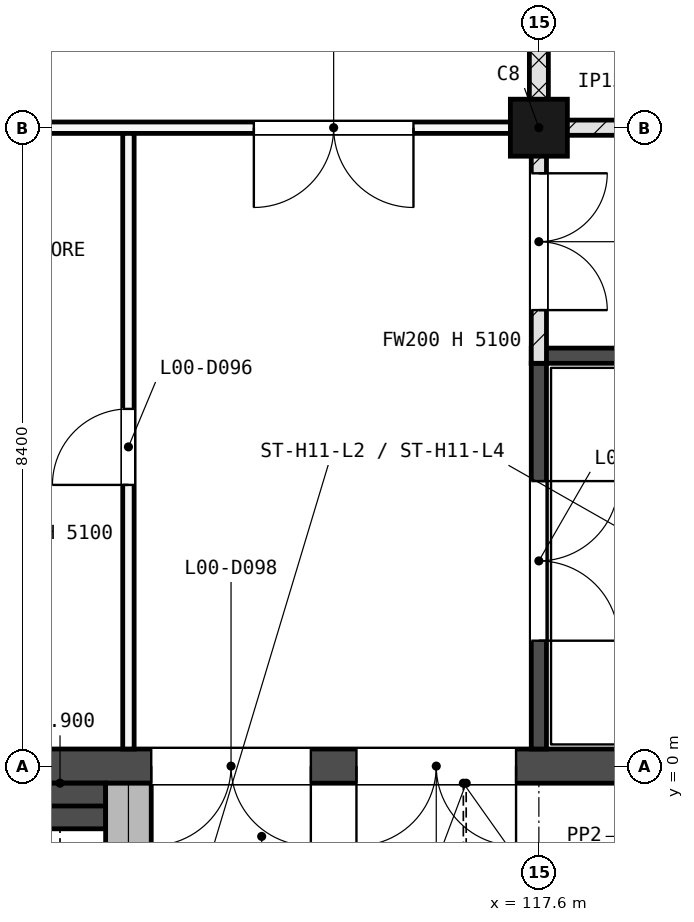
"""IFC4 building model, lengths in metres.
Left out: names, types, materials, properties, quantities, classifications, styles, units other than length and angle.
Written with IfcOpenShell. Run it as: python <this file> out.ifc"""

import sys

from ifc_helpers import new_model, si_unit, direction, frame, frame_2d, origin, origin_2d, place, context, subcontext, project, spatial, rectangle, extrude, element, fill, save


model = new_model("IFC4")
c1 = context("Model", 3, precision=1e-05, world=origin(), true_north=direction((0.0, 1.0)))
c2 = subcontext(c1, "Body", "Model", "MODEL_VIEW")
j1 = project(units=[si_unit("LENGTHUNIT", "METRE"), si_unit("PLANEANGLEUNIT", "RADIAN")], contexts=[c1])
p1 = place(None, origin())
s1 = spatial("IfcSite", under=j1, at=p1, CompositionType="ELEMENT")
p2 = place(p1, origin())
s2 = spatial("IfcBuilding", under=s1, at=p2, CompositionType="ELEMENT")
p3 = place(p2, origin())
s3 = spatial("IfcBuildingStorey", under=s2, at=p3, CompositionType="ELEMENT", Elevation=0.0)
p4 = place(p3, frame((117.6, 8.4, -0.3), z_axis=(0.0, 0.0, 1.0), x_axis=(1.0, 0.0, 0.0)))
e1 = element("IfcColumn", 1, at=p4, inside=s3, PredefinedType="COLUMN", context=c2, shape_type="SweptSolid", body=[
    extrude(rectangle(XDim=0.75, YDim=0.75, at=origin_2d()), origin(), (0.0, 0.0, 1.0), 5.4),
])
p5 = place(p3, frame((0.0, 0.0, -0.3), z_axis=(0.0, 0.0, 1.0), x_axis=(1.0, 0.0, 0.0)))
e2 = element("IfcWall", 2, at=p5, inside=s3, PredefinedType="SOLIDWALL", context=c2, shape_type="SweptSolid", body=[
    extrude(rectangle(XDim=168.0, YDim=0.45, at=frame_2d((84.0, 0.0))), origin(), (0.0, 0.0, 1.0), 5.4),
])
p6 = place(p5, frame((34.8, 0.0, 2.7)))
e3 = element("IfcOpeningElement", 3, at=p6, cuts=e2, PredefinedType="OPENING", context=c2, shape_type="SweptSolid", body=[
    extrude(rectangle(XDim=1.8, YDim=1.2, at=frame_2d((0.9, 0.6))), frame((0.0, 0.235, 0.0), z_axis=(0.0, -1.0, 0.0), x_axis=(1.0, 0.0, 0.0)), (0.0, 0.0, 1.0), 0.47),
])
p7 = place(p5, frame((69.075, 0.0, 1.5)))
e4 = element("IfcOpeningElement", 4, at=p7, cuts=e2, PredefinedType="OPENING", context=c2, shape_type="SweptSolid", body=[
    extrude(rectangle(XDim=0.45, YDim=2.4, at=frame_2d((0.225, 1.2))), frame((0.0, 0.235, 0.0), z_axis=(0.0, -1.0, 0.0), x_axis=(1.0, 0.0, 0.0)), (0.0, 0.0, 1.0), 0.47),
])
p8 = place(p5, frame((73.275, 0.0, 1.5)))
e5 = element("IfcOpeningElement", 5, at=p8, cuts=e2, PredefinedType="OPENING", context=c2, shape_type="SweptSolid", body=[
    extrude(rectangle(XDim=0.45, YDim=2.4, at=frame_2d((0.225, 1.2))), frame((0.0, 0.235, 0.0), z_axis=(0.0, -1.0, 0.0), x_axis=(1.0, 0.0, 0.0)), (0.0, 0.0, 1.0), 0.47),
])
p9 = place(p5, frame((135.0, 0.0, 2.7)))
e6 = element("IfcOpeningElement", 6, at=p9, cuts=e2, PredefinedType="OPENING", context=c2, shape_type="SweptSolid", body=[
    extrude(rectangle(XDim=1.8, YDim=1.2, at=frame_2d((0.9, 0.6))), frame((0.0, 0.235, 0.0), z_axis=(0.0, -1.0, 0.0), x_axis=(1.0, 0.0, 0.0)), (0.0, 0.0, 1.0), 0.47),
])
p10 = place(p5, frame((144.0, 0.0, 2.7)))
e7 = element("IfcOpeningElement", 7, at=p10, cuts=e2, PredefinedType="OPENING", context=c2, shape_type="SweptSolid", body=[
    extrude(rectangle(XDim=1.8, YDim=1.2, at=frame_2d((0.9, 0.6))), frame((0.0, 0.235, 0.0), z_axis=(0.0, -1.0, 0.0), x_axis=(1.0, 0.0, 0.0)), (0.0, 0.0, 1.0), 0.47),
])
p11 = place(p5, frame((114.6, 0.0, 0.3), z_axis=(0.0, 0.0, 1.0), x_axis=(-1.0, 0.0, 0.0)))
e8 = element("IfcOpeningElement", 8, at=p11, cuts=e2, PredefinedType="OPENING", context=c2, shape_type="SweptSolid", body=[
    extrude(rectangle(XDim=2.1, YDim=2.2, at=frame_2d((1.05, 1.1))), frame((0.0, 0.235, 0.0), z_axis=(0.0, -1.0, 0.0), x_axis=(1.0, 0.0, 0.0)), (0.0, 0.0, 1.0), 0.47),
])
p12 = place(p5, frame((117.3, 0.0, 0.3), z_axis=(0.0, 0.0, 1.0), x_axis=(-1.0, 0.0, 0.0)))
e9 = element("IfcOpeningElement", 9, at=p12, cuts=e2, PredefinedType="OPENING", context=c2, shape_type="SweptSolid", body=[
    extrude(rectangle(XDim=2.1, YDim=2.2, at=frame_2d((1.05, 1.1))), frame((0.0, 0.235, 0.0), z_axis=(0.0, -1.0, 0.0), x_axis=(1.0, 0.0, 0.0)), (0.0, 0.0, 1.0), 0.47),
])
p13 = place(p5, frame((106.05, 0.0, 0.3), z_axis=(0.0, 0.0, 1.0), x_axis=(-1.0, 0.0, 0.0)))
e10 = element("IfcOpeningElement", 10, at=p13, cuts=e2, PredefinedType="OPENING", context=c2, shape_type="SweptSolid", body=[
    extrude(rectangle(XDim=2.1, YDim=2.2, at=frame_2d((1.05, 1.1))), frame((0.0, 0.235, 0.0), z_axis=(0.0, -1.0, 0.0), x_axis=(1.0, 0.0, 0.0)), (0.0, 0.0, 1.0), 0.47),
])
p14 = place(p5, frame((57.25, 0.0, 0.3), z_axis=(0.0, 0.0, 1.0), x_axis=(-1.0, 0.0, 0.0)))
e11 = element("IfcOpeningElement", 11, at=p14, cuts=e2, PredefinedType="OPENING", context=c2, shape_type="SweptSolid", body=[
    extrude(rectangle(XDim=2.1, YDim=2.2, at=frame_2d((1.05, 1.1))), frame((0.0, 0.235, 0.0), z_axis=(0.0, -1.0, 0.0), x_axis=(1.0, 0.0, 0.0)), (0.0, 0.0, 1.0), 0.47),
])
p15 = place(p5, frame((120.75, 0.0, 0.3), z_axis=(0.0, 0.0, 1.0), x_axis=(-1.0, 0.0, 0.0)))
e12 = element("IfcOpeningElement", 12, at=p15, cuts=e2, PredefinedType="OPENING", context=c2, shape_type="SweptSolid", body=[
    extrude(rectangle(XDim=2.1, YDim=2.2, at=frame_2d((1.05, 1.1))), frame((0.0, 0.235, 0.0), z_axis=(0.0, -1.0, 0.0), x_axis=(1.0, 0.0, 0.0)), (0.0, 0.0, 1.0), 0.47),
])
p16 = place(p5, frame((124.95, 0.0, 0.3), z_axis=(0.0, 0.0, 1.0), x_axis=(-1.0, 0.0, 0.0)))
e13 = element("IfcOpeningElement", 13, at=p16, cuts=e2, PredefinedType="OPENING", context=c2, shape_type="SweptSolid", body=[
    extrude(rectangle(XDim=2.1, YDim=2.2, at=frame_2d((1.05, 1.1))), frame((0.0, 0.235, 0.0), z_axis=(0.0, -1.0, 0.0), x_axis=(1.0, 0.0, 0.0)), (0.0, 0.0, 1.0), 0.47),
])
p17 = place(p5, frame((19.45, 0.0, 0.3), z_axis=(0.0, 0.0, 1.0), x_axis=(-1.0, 0.0, 0.0)))
e14 = element("IfcOpeningElement", 14, at=p17, cuts=e2, PredefinedType="OPENING", context=c2, shape_type="SweptSolid", body=[
    extrude(rectangle(XDim=2.1, YDim=2.2, at=frame_2d((1.05, 1.1))), frame((0.0, 0.235, 0.0), z_axis=(0.0, -1.0, 0.0), x_axis=(1.0, 0.0, 0.0)), (0.0, 0.0, 1.0), 0.47),
])
p18 = place(p5, frame((162.25, 0.0, 0.3), z_axis=(0.0, 0.0, 1.0), x_axis=(-1.0, 0.0, 0.0)))
e15 = element("IfcOpeningElement", 15, at=p18, cuts=e2, PredefinedType="OPENING", context=c2, shape_type="SweptSolid", body=[
    extrude(rectangle(XDim=2.1, YDim=2.2, at=frame_2d((1.05, 1.1))), frame((0.0, 0.235, 0.0), z_axis=(0.0, -1.0, 0.0), x_axis=(1.0, 0.0, 0.0)), (0.0, 0.0, 1.0), 0.47),
])
p19 = place(p5, frame((4.8, 0.0, 0.3), z_axis=(0.0, 0.0, 1.0), x_axis=(-1.0, 0.0, 0.0)))
e16 = element("IfcOpeningElement", 16, at=p19, cuts=e2, PredefinedType="OPENING", context=c2, shape_type="SweptSolid", body=[
    extrude(rectangle(XDim=1.2, YDim=2.2, at=frame_2d((0.6, 1.1))), frame((0.0, 0.235, 0.0), z_axis=(0.0, -1.0, 0.0), x_axis=(1.0, 0.0, 0.0)), (0.0, 0.0, 1.0), 0.47),
])
p20 = place(p5, frame((64.8, 0.0, 0.3), z_axis=(0.0, 0.0, 1.0), x_axis=(-1.0, 0.0, 0.0)))
e17 = element("IfcOpeningElement", 17, at=p20, cuts=e2, PredefinedType="OPENING", context=c2, shape_type="SweptSolid", body=[
    extrude(rectangle(XDim=1.2, YDim=2.2, at=frame_2d((0.6, 1.1))), frame((0.0, 0.235, 0.0), z_axis=(0.0, -1.0, 0.0), x_axis=(1.0, 0.0, 0.0)), (0.0, 0.0, 1.0), 0.47),
])
p21 = place(p5, frame((81.0, 0.0, 0.3), z_axis=(0.0, 0.0, 1.0), x_axis=(-1.0, 0.0, 0.0)))
e18 = element("IfcOpeningElement", 18, at=p21, cuts=e2, PredefinedType="OPENING", context=c2, shape_type="SweptSolid", body=[
    extrude(rectangle(XDim=2.4, YDim=2.4, at=frame_2d((1.2, 1.2))), frame((0.0, 0.235, 0.0), z_axis=(0.0, -1.0, 0.0), x_axis=(1.0, 0.0, 0.0)), (0.0, 0.0, 1.0), 0.47),
])
p22 = place(p5, frame((97.8, 0.0, 0.3), z_axis=(0.0, 0.0, 1.0), x_axis=(-1.0, 0.0, 0.0)))
e19 = element("IfcOpeningElement", 19, at=p22, cuts=e2, PredefinedType="OPENING", context=c2, shape_type="SweptSolid", body=[
    extrude(rectangle(XDim=2.4, YDim=2.4, at=frame_2d((1.2, 1.2))), frame((0.0, 0.235, 0.0), z_axis=(0.0, -1.0, 0.0), x_axis=(1.0, 0.0, 0.0)), (0.0, 0.0, 1.0), 0.47),
])
p23 = place(p5, frame((139.8, 0.0, 0.3), z_axis=(0.0, 0.0, 1.0), x_axis=(-1.0, 0.0, 0.0)))
e20 = element("IfcOpeningElement", 20, at=p23, cuts=e2, PredefinedType="OPENING", context=c2, shape_type="SweptSolid", body=[
    extrude(rectangle(XDim=2.4, YDim=2.1, at=frame_2d((1.2, 1.05))), frame((0.0, 0.235, 0.0), z_axis=(0.0, -1.0, 0.0), x_axis=(1.0, 0.0, 0.0)), (0.0, 0.0, 1.0), 0.47),
])
p24 = place(p5, frame((156.3, 0.0, 0.3), z_axis=(0.0, 0.0, 1.0), x_axis=(-1.0, 0.0, 0.0)))
e21 = element("IfcOpeningElement", 21, at=p24, cuts=e2, PredefinedType="OPENING", context=c2, shape_type="SweptSolid", body=[
    extrude(rectangle(XDim=1.8, YDim=2.2, at=frame_2d((0.9, 1.1))), frame((0.0, 0.235, 0.0), z_axis=(0.0, -1.0, 0.0), x_axis=(1.0, 0.0, 0.0)), (0.0, 0.0, 1.0), 0.47),
])
p25 = place(p3, frame((109.6, -0.525, 0.0), z_axis=(0.0, 0.0, 1.0), x_axis=(1.0, 0.0, 0.0)))
e22 = element("IfcWall", 22, at=p25, inside=s3, PredefinedType="SOLIDWALL", context=c2, shape_type="SweptSolid", body=[
    extrude(rectangle(XDim=2.3, YDim=0.6, at=frame_2d((1.15, 0.0))), origin(), (0.0, 0.0, 1.0), 0.45),
])
p26 = place(p3, frame((109.6, -0.375, 0.45), z_axis=(0.0, 0.0, 1.0), x_axis=(1.0, 0.0, 0.0)))
e23 = element("IfcWall", 23, at=p26, inside=s3, PredefinedType="SOLIDWALL", context=c2, shape_type="SweptSolid", body=[
    extrude(rectangle(XDim=2.3, YDim=0.3, at=frame_2d((1.15, 0.0))), origin(), (0.0, 0.0, 1.0), 0.45),
])
p27 = place(p3, frame((112.2, -0.225, 0.0), z_axis=(0.0, 0.0, 1.0), x_axis=(0.0, -1.0, 0.0)))
e24 = element("IfcWall", 24, at=p27, inside=s3, PredefinedType="SOLIDWALL", context=c2, shape_type="SweptSolid", body=[
    extrude(rectangle(XDim=1.4, YDim=0.6, at=frame_2d((0.7, 0.0))), origin(), (0.0, 0.0, 1.0), 4.45),
])
p28 = place(p3, frame((117.5, 5.4, 0.0), z_axis=(0.0, 0.0, 1.0), x_axis=(1.0, 0.0, 0.0)))
e25 = element("IfcWall", 25, at=p28, inside=s3, PredefinedType="SHEAR", context=c2, shape_type="SweptSolid", body=[
    extrude(rectangle(XDim=8.6, YDim=0.2, at=frame_2d((4.3, 0.0))), origin(), (0.0, 0.0, 1.0), 5.1),
])
p29 = place(p3, frame((117.6, 0.225, 0.0), z_axis=(0.0, 0.0, 1.0), x_axis=(0.0, 1.0, 0.0)))
e26 = element("IfcWall", 26, at=p29, inside=s3, PredefinedType="SHEAR", context=c2, shape_type="SweptSolid", body=[
    extrude(rectangle(XDim=5.075, YDim=0.2, at=frame_2d((2.538, 0.0))), origin(), (0.0, 0.0, 1.0), 5.1),
])
p30 = place(p29, frame((1.425, 0.0, 0.0)))
e27 = element("IfcOpeningElement", 27, at=p30, cuts=e26, PredefinedType="OPENING", context=c2, shape_type="SweptSolid", body=[
    extrude(rectangle(XDim=2.1, YDim=2.1, at=frame_2d((1.05, 1.05))), frame((0.0, 0.11, 0.0), z_axis=(0.0, -1.0, 0.0), x_axis=(1.0, 0.0, 0.0)), (0.0, 0.0, 1.0), 0.22),
])
p31 = place(p3, frame((92.755, 8.4, 0.0), z_axis=(0.0, 0.0, 1.0), x_axis=(1.0, 0.0, 0.0)))
e28 = element("IfcWall", 28, at=p31, inside=s3, PredefinedType="PARTITIONING", context=c2, shape_type="SweptSolid", body=[
    extrude(rectangle(XDim=24.845, YDim=0.15, at=frame_2d((12.423, 0.0))), origin(), (0.0, 0.0, 1.0), 4.3),
])
p32 = place(p31, frame((21.095, 0.0, 0.0)))
e29 = element("IfcOpeningElement", 29, at=p32, cuts=e28, PredefinedType="OPENING", context=c2, shape_type="SweptSolid", body=[
    extrude(rectangle(XDim=2.1, YDim=2.4, at=frame_2d((1.05, 1.2))), frame((0.0, 0.085, 0.0), z_axis=(0.0, -1.0, 0.0), x_axis=(1.0, 0.0, 0.0)), (0.0, 0.0, 1.0), 0.17),
])
p33 = place(p3, frame((117.6, 8.4, 0.0), z_axis=(0.0, 0.0, 1.0), x_axis=(1.0, 0.0, 0.0)))
e30 = element("IfcWall", 30, at=p33, inside=s3, PredefinedType="SOLIDWALL", context=c2, shape_type="SweptSolid", body=[
    extrude(rectangle(XDim=42.0, YDim=0.2, at=frame_2d((21.0, 0.0))), origin(), (0.0, 0.0, 1.0), 4.3),
])
p34 = place(p33, frame((37.3, 0.0, 0.0)))
e31 = element("IfcOpeningElement", 31, at=p34, cuts=e30, PredefinedType="OPENING", context=c2, shape_type="SweptSolid", body=[
    extrude(rectangle(XDim=1.0, YDim=2.1, at=frame_2d((0.5, 1.05))), frame((0.0, 0.11, 0.0), z_axis=(0.0, -1.0, 0.0), x_axis=(1.0, 0.0, 0.0)), (0.0, 0.0, 1.0), 0.22),
])
p35 = place(p3, frame((112.2, 0.225, 0.0), z_axis=(0.0, 0.0, 1.0), x_axis=(0.0, 1.0, 0.0)))
e32 = element("IfcWall", 32, at=p35, inside=s3, PredefinedType="PARTITIONING", context=c2, shape_type="SweptSolid", body=[
    extrude(rectangle(XDim=8.1, YDim=0.15, at=frame_2d((4.05, 0.0))), origin(), (0.0, 0.0, 1.0), 5.1),
])
p36 = place(p35, frame((3.475, 0.0, 0.0)))
e33 = element("IfcOpeningElement", 33, at=p36, cuts=e32, PredefinedType="OPENING", context=c2, shape_type="SweptSolid", body=[
    extrude(rectangle(XDim=1.0, YDim=2.25, at=frame_2d((0.5, 1.125))), frame((0.0, 0.085, 0.0), z_axis=(0.0, -1.0, 0.0), x_axis=(1.0, 0.0, 0.0)), (0.0, 0.0, 1.0), 0.17),
])
p37 = place(p3, frame((117.6, 5.3, 0.0), z_axis=(0.0, 0.0, 1.0), x_axis=(0.0, 1.0, 0.0)))
e34 = element("IfcWall", 34, at=p37, inside=s3, PredefinedType="SOLIDWALL", context=c2, shape_type="SweptSolid", body=[
    extrude(rectangle(XDim=3.0, YDim=0.2, at=frame_2d((1.5, 0.0))), origin(), (0.0, 0.0, 1.0), 5.1),
])
p38 = place(p37, frame((0.7, 0.0, 0.0)))
e35 = element("IfcOpeningElement", 35, at=p38, cuts=e34, PredefinedType="OPENING", context=c2, shape_type="SweptSolid", body=[
    extrude(rectangle(XDim=1.8, YDim=2.4, at=frame_2d((0.9, 1.2))), frame((0.0, 0.11, 0.0), z_axis=(0.0, -1.0, 0.0), x_axis=(1.0, 0.0, 0.0)), (0.0, 0.0, 1.0), 0.22),
])
p39 = place(p3, frame((117.6, 8.5, 0.0), z_axis=(0.0, 0.0, 1.0), x_axis=(0.0, 1.0, 0.0)))
e36 = element("IfcWall", 36, at=p39, inside=s3, PredefinedType="SOLIDWALL", context=c2, shape_type="SweptSolid", body=[
    extrude(rectangle(XDim=16.625, YDim=0.25, at=frame_2d((8.312, 0.0))), origin(), (0.0, 0.0, 1.0), 4.3),
])
p40 = place(p39, frame((1.64, 0.0, 0.0)))
e37 = element("IfcOpeningElement", 37, at=p40, cuts=e36, PredefinedType="OPENING", context=c2, shape_type="SweptSolid", body=[
    extrude(rectangle(XDim=1.0, YDim=2.1, at=frame_2d((0.5, 1.05))), frame((0.0, 0.135, 0.0), z_axis=(0.0, -1.0, 0.0), x_axis=(1.0, 0.0, 0.0)), (0.0, 0.0, 1.0), 0.27),
])
p41 = place(p11, origin())
e38 = element("IfcDoor", 38, at=p41, inside=s3, OperationType="SINGLE_SWING_LEFT", PredefinedType="DOOR", context=c2, shape_type="SweptSolid", body=[
    extrude(rectangle(XDim=2.1, YDim=0.013, at=frame_2d((1.05, 0.007))), frame((0.0, 0.115, 0.0), z_axis=(0.0, -1.0, 0.0), x_axis=(1.0, 0.0, 0.0)), (0.0, 0.0, 1.0), 0.23),
    extrude(rectangle(XDim=0.075, YDim=2.112, at=frame_2d((0.038, 1.069))), frame((0.0, 0.125, 0.0), z_axis=(0.0, -1.0, 0.0), x_axis=(1.0, 0.0, 0.0)), (0.0, 0.0, 1.0), 0.25),
    extrude(rectangle(XDim=0.075, YDim=2.112, at=frame_2d((2.062, 1.069))), frame((0.0, 0.125, 0.0), z_axis=(0.0, -1.0, 0.0), x_axis=(1.0, 0.0, 0.0)), (0.0, 0.0, 1.0), 0.25),
    extrude(rectangle(XDim=2.1, YDim=0.075, at=frame_2d((1.05, 2.163))), frame((0.0, 0.115, 0.0), z_axis=(0.0, -1.0, 0.0), x_axis=(1.0, 0.0, 0.0)), (0.0, 0.0, 1.0), 0.23),
    extrude(rectangle(XDim=1.95, YDim=0.3, at=frame_2d((1.05, 0.163))), frame((0.0, 0.02, 0.0), z_axis=(0.0, -1.0, 0.0), x_axis=(1.0, 0.0, 0.0)), (0.0, 0.0, 1.0), 0.04),
    extrude(rectangle(XDim=1.95, YDim=0.12, at=frame_2d((1.05, 2.065))), frame((0.0, 0.02, 0.0), z_axis=(0.0, -1.0, 0.0), x_axis=(1.0, 0.0, 0.0)), (0.0, 0.0, 1.0), 0.04),
    extrude(rectangle(XDim=0.09, YDim=1.692, at=frame_2d((0.12, 1.159))), frame((0.0, 0.025, 0.0), z_axis=(0.0, -1.0, 0.0), x_axis=(1.0, 0.0, 0.0)), (0.0, 0.0, 1.0), 0.05),
    extrude(rectangle(XDim=0.18, YDim=1.692, at=frame_2d((1.05, 1.159))), frame((0.0, 0.025, 0.0), z_axis=(0.0, -1.0, 0.0), x_axis=(1.0, 0.0, 0.0)), (0.0, 0.0, 1.0), 0.05),
    extrude(rectangle(XDim=0.09, YDim=1.692, at=frame_2d((1.98, 1.159))), frame((0.0, 0.025, 0.0), z_axis=(0.0, -1.0, 0.0), x_axis=(1.0, 0.0, 0.0)), (0.0, 0.0, 1.0), 0.05),
    extrude(rectangle(XDim=0.795, YDim=1.692, at=frame_2d((0.562, 1.159))), frame((0.0, 0.012, 0.0), z_axis=(0.0, -1.0, 0.0), x_axis=(1.0, 0.0, 0.0)), (0.0, 0.0, 1.0), 0.024),
    extrude(rectangle(XDim=0.795, YDim=1.692, at=frame_2d((1.538, 1.159))), frame((0.0, 0.012, 0.0), z_axis=(0.0, -1.0, 0.0), x_axis=(1.0, 0.0, 0.0)), (0.0, 0.0, 1.0), 0.024),
])
fill(e8, e38)
p42 = place(p12, origin())
e39 = element("IfcDoor", 39, at=p42, inside=s3, OperationType="SINGLE_SWING_LEFT", PredefinedType="DOOR", context=c2, shape_type="SweptSolid", body=[
    extrude(rectangle(XDim=2.1, YDim=0.013, at=frame_2d((1.05, 0.007))), frame((0.0, 0.115, 0.0), z_axis=(0.0, -1.0, 0.0), x_axis=(1.0, 0.0, 0.0)), (0.0, 0.0, 1.0), 0.23),
    extrude(rectangle(XDim=0.075, YDim=2.112, at=frame_2d((0.038, 1.069))), frame((0.0, 0.125, 0.0), z_axis=(0.0, -1.0, 0.0), x_axis=(1.0, 0.0, 0.0)), (0.0, 0.0, 1.0), 0.25),
    extrude(rectangle(XDim=0.075, YDim=2.112, at=frame_2d((2.062, 1.069))), frame((0.0, 0.125, 0.0), z_axis=(0.0, -1.0, 0.0), x_axis=(1.0, 0.0, 0.0)), (0.0, 0.0, 1.0), 0.25),
    extrude(rectangle(XDim=2.1, YDim=0.075, at=frame_2d((1.05, 2.163))), frame((0.0, 0.115, 0.0), z_axis=(0.0, -1.0, 0.0), x_axis=(1.0, 0.0, 0.0)), (0.0, 0.0, 1.0), 0.23),
    extrude(rectangle(XDim=1.95, YDim=0.3, at=frame_2d((1.05, 0.163))), frame((0.0, 0.02, 0.0), z_axis=(0.0, -1.0, 0.0), x_axis=(1.0, 0.0, 0.0)), (0.0, 0.0, 1.0), 0.04),
    extrude(rectangle(XDim=1.95, YDim=0.12, at=frame_2d((1.05, 2.065))), frame((0.0, 0.02, 0.0), z_axis=(0.0, -1.0, 0.0), x_axis=(1.0, 0.0, 0.0)), (0.0, 0.0, 1.0), 0.04),
    extrude(rectangle(XDim=0.09, YDim=1.692, at=frame_2d((0.12, 1.159))), frame((0.0, 0.025, 0.0), z_axis=(0.0, -1.0, 0.0), x_axis=(1.0, 0.0, 0.0)), (0.0, 0.0, 1.0), 0.05),
    extrude(rectangle(XDim=0.18, YDim=1.692, at=frame_2d((1.05, 1.159))), frame((0.0, 0.025, 0.0), z_axis=(0.0, -1.0, 0.0), x_axis=(1.0, 0.0, 0.0)), (0.0, 0.0, 1.0), 0.05),
    extrude(rectangle(XDim=0.09, YDim=1.692, at=frame_2d((1.98, 1.159))), frame((0.0, 0.025, 0.0), z_axis=(0.0, -1.0, 0.0), x_axis=(1.0, 0.0, 0.0)), (0.0, 0.0, 1.0), 0.05),
    extrude(rectangle(XDim=0.795, YDim=1.692, at=frame_2d((0.562, 1.159))), frame((0.0, 0.012, 0.0), z_axis=(0.0, -1.0, 0.0), x_axis=(1.0, 0.0, 0.0)), (0.0, 0.0, 1.0), 0.024),
    extrude(rectangle(XDim=0.795, YDim=1.692, at=frame_2d((1.538, 1.159))), frame((0.0, 0.012, 0.0), z_axis=(0.0, -1.0, 0.0), x_axis=(1.0, 0.0, 0.0)), (0.0, 0.0, 1.0), 0.024),
])
fill(e9, e39)
p43 = place(p30, origin())
e40 = element("IfcDoor", 40, at=p43, inside=s3, OperationType="DOUBLE_DOOR_SINGLE_SWING", PredefinedType="DOOR", context=c2, shape_type="SweptSolid", body=[
    extrude(rectangle(XDim=2.1, YDim=2.1, at=frame_2d((1.05, 1.05))), frame((0.0, 0.025, 0.0), z_axis=(0.0, -1.0, 0.0), x_axis=(1.0, 0.0, 0.0)), (0.0, 0.0, 1.0), 0.05),
])
fill(e27, e40)
p44 = place(p36, origin())
e41 = element("IfcDoor", 41, at=p44, inside=s3, OperationType="SINGLE_SWING_RIGHT", PredefinedType="DOOR", context=c2, shape_type="SweptSolid", body=[
    extrude(rectangle(XDim=1.0, YDim=2.25, at=frame_2d((0.5, 1.125))), frame((0.0, 0.025, 0.0), z_axis=(0.0, -1.0, 0.0), x_axis=(1.0, 0.0, 0.0)), (0.0, 0.0, 1.0), 0.05),
])
fill(e33, e41)
p45 = place(p38, origin())
e42 = element("IfcDoor", 42, at=p45, inside=s3, OperationType="DOUBLE_DOOR_SINGLE_SWING", PredefinedType="DOOR", context=c2, shape_type="SweptSolid", body=[
    extrude(rectangle(XDim=1.8, YDim=2.4, at=frame_2d((0.9, 1.2))), frame((0.0, 0.025, 0.0), z_axis=(0.0, -1.0, 0.0), x_axis=(1.0, 0.0, 0.0)), (0.0, 0.0, 1.0), 0.05),
])
fill(e35, e42)
p46 = place(p32, origin())
e43 = element("IfcDoor", 43, at=p46, inside=s3, OperationType="DOUBLE_DOOR_SINGLE_SWING", PredefinedType="DOOR", context=c2, shape_type="SweptSolid", body=[
    extrude(rectangle(XDim=2.1, YDim=2.4, at=frame_2d((1.05, 1.2))), frame((0.0, 0.025, 0.0), z_axis=(0.0, -1.0, 0.0), x_axis=(1.0, 0.0, 0.0)), (0.0, 0.0, 1.0), 0.05),
])
fill(e29, e43)
save(model, sys.argv[1])
